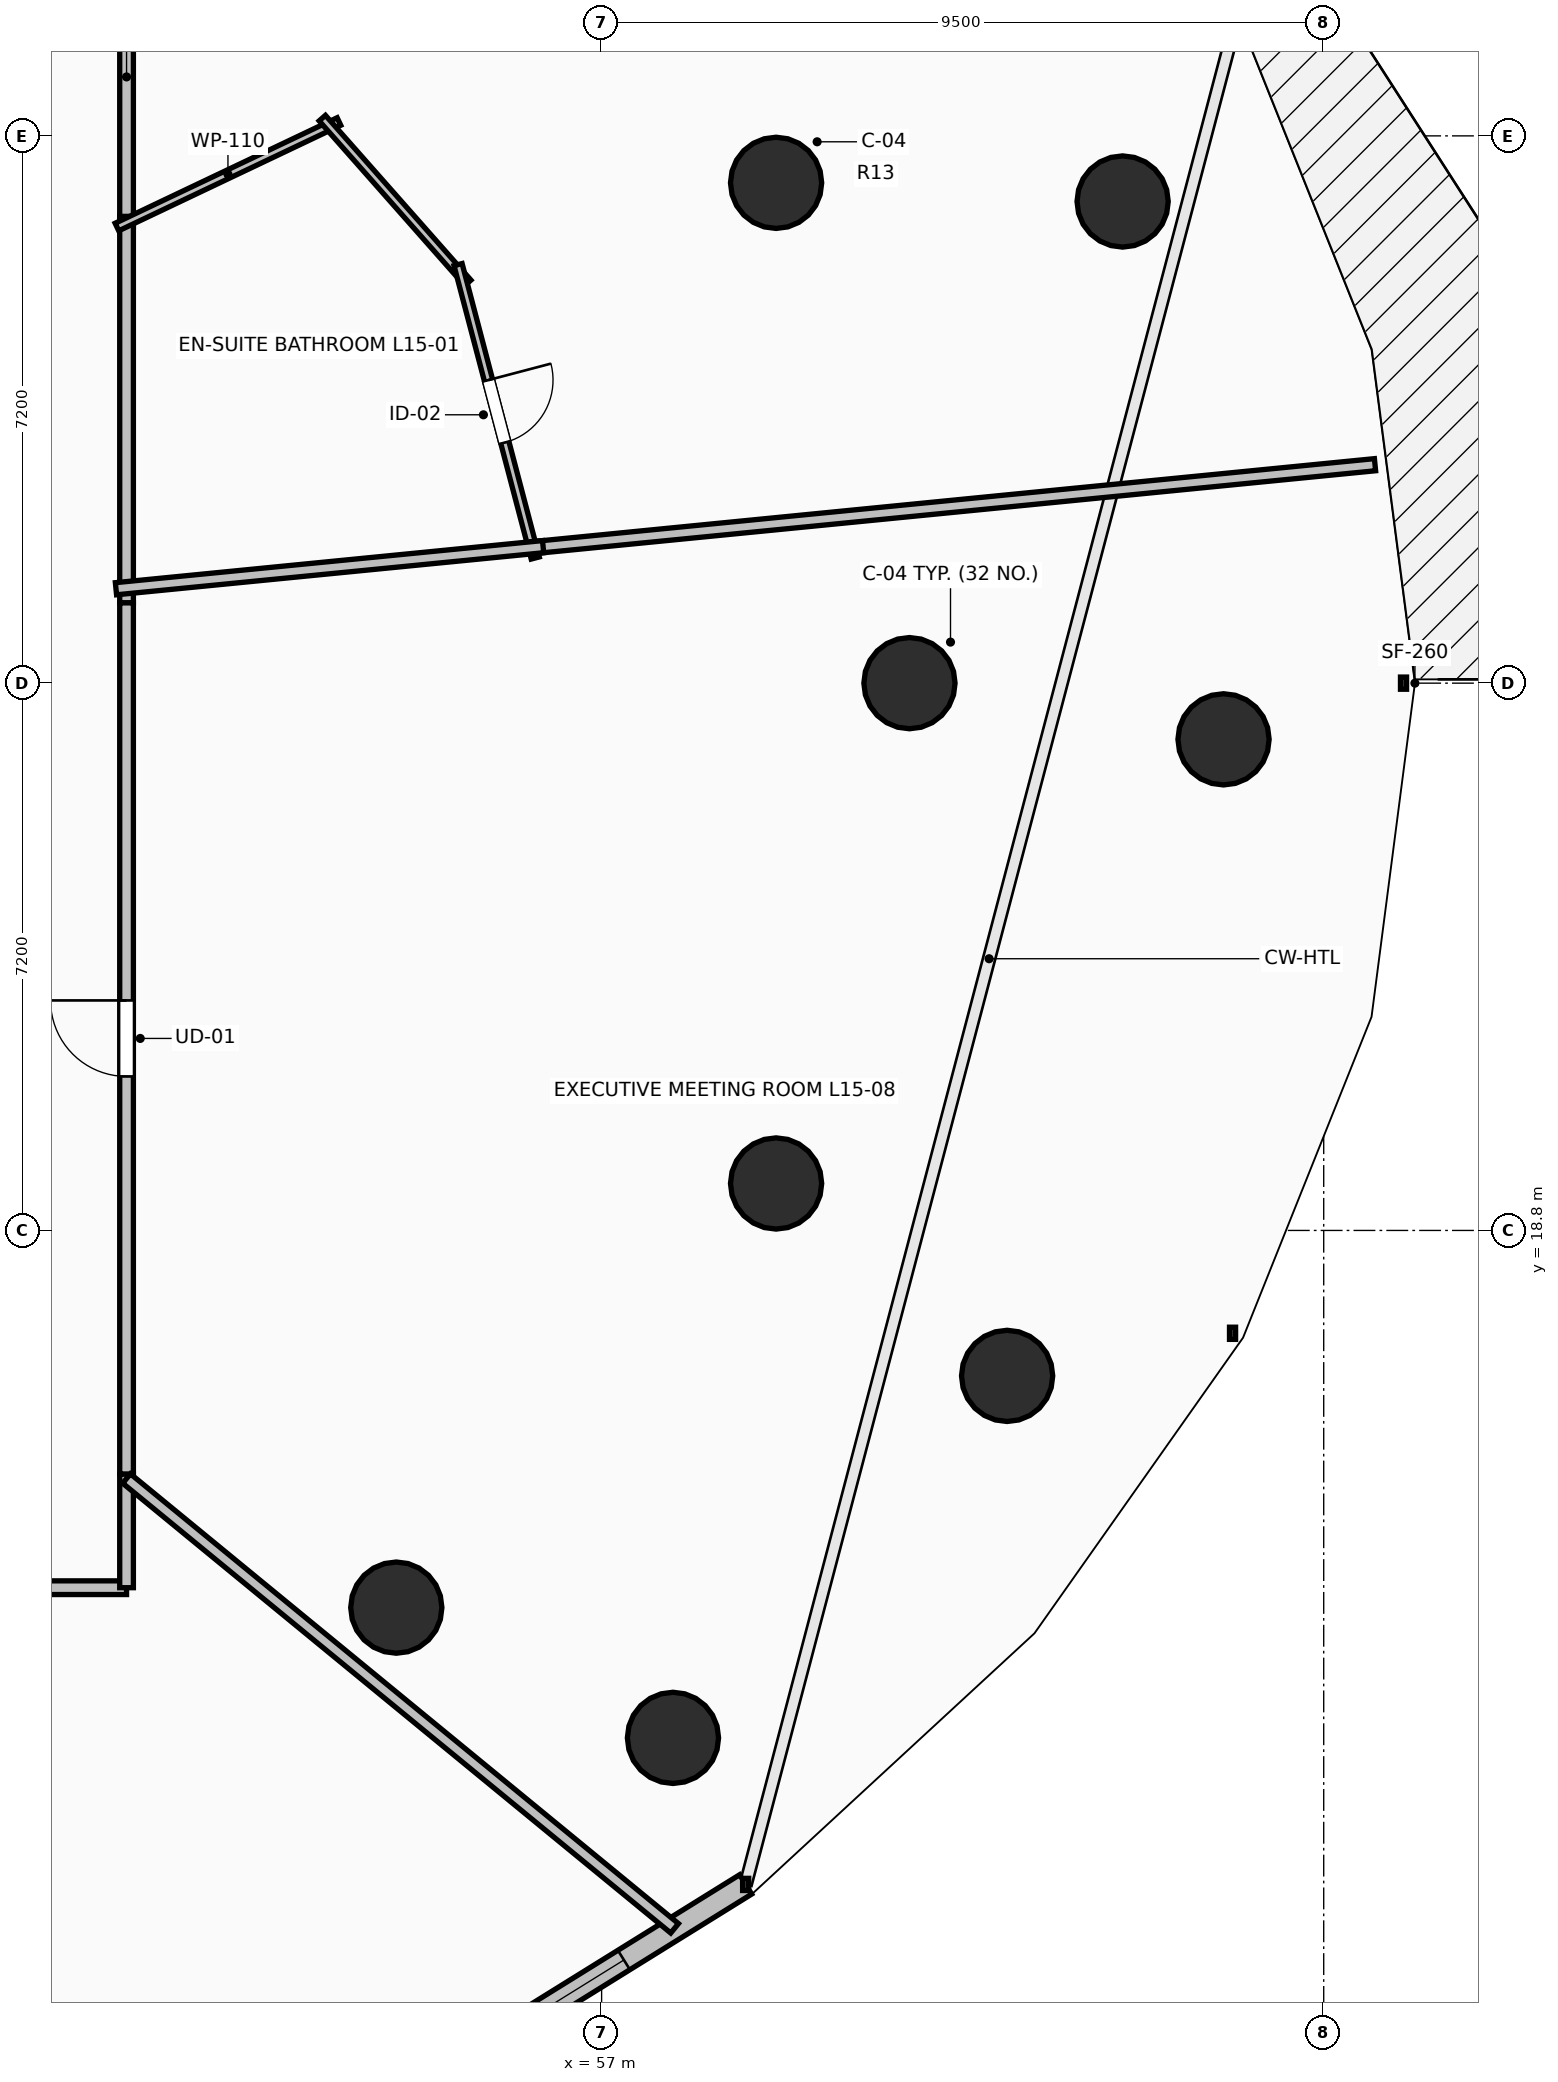
"""IFC4 building model, lengths in metres.
Left out: names, types, materials, properties, quantities, classifications, styles, units other than length and angle.
Written with IfcOpenShell. Run it as: python <this file> out.ifc"""

import sys

from ifc_helpers import new_model, si_unit, direction, frame, frame_2d, origin, origin_2d, place, context, subcontext, project, spatial, rectangle, circle, extrude, element, fill, save


model = new_model("IFC4")
c1 = context("Model", 3, precision=1e-05, world=origin(), true_north=direction((0.0, 1.0)))
c2 = subcontext(c1, "Body", "Model", "MODEL_VIEW")
j1 = project(units=[si_unit("LENGTHUNIT", "METRE"), si_unit("PLANEANGLEUNIT", "RADIAN")], contexts=[c1])
p1 = place(None, origin())
s1 = spatial("IfcSite", under=j1, at=p1, CompositionType="ELEMENT")
p2 = place(p1, origin())
s2 = spatial("IfcBuilding", under=s1, at=p2, CompositionType="ELEMENT")
p3 = place(p2, frame((0.0, 0.0, 59.0)))
s3 = spatial("IfcBuildingStorey", under=s2, at=p3, CompositionType="ELEMENT", Elevation=59.0)
for number, where, z_axis, x_axis in (
    (1, (61.05, 26.0, 0.0), (0.0, 0.0, 1.0), (1.0, 0.0, 0.0)),
    (2, (59.295, 32.582, 0.0), (0.0, 0.0, 1.0), (0.924, 0.383, 0.0)),
    (3, (54.299, 13.838, 0.0), (0.0, 0.0, 1.0), (0.707, -0.707, 0.0)),
    (4, (59.295, 19.418, 0.0), (0.0, 0.0, 1.0), (0.924, -0.383, 0.0)),
    (5, (65.182, 25.261, 0.0), (0.0, 0.0, 1.0), (1.0, 0.0, 0.0)),
    (6, (63.854, 32.337, 0.0), (0.0, 0.0, 1.0), (0.924, 0.383, 0.0)),
    (7, (57.939, 12.124, 0.0), (0.0, 0.0, 1.0), (0.707, -0.707, 0.0)),
    (8, (62.335, 16.886, 0.0), (0.0, 0.0, 1.0), (0.924, -0.383, 0.0)),
):
    element("IfcColumn", number, at=place(p3, frame(where, z_axis=z_axis, x_axis=x_axis)), inside=s3, PredefinedType="COLUMN", context=c2, shape_type="SweptSolid", body=[
        extrude(circle(Radius=0.6, at=origin_2d()), origin(), (0.0, 0.0, 1.0), 3.5),
    ])
p4 = place(p3, frame((54.417, 7.417, 0.0), z_axis=(0.0, 0.0, 1.0), x_axis=(0.849633724826, 0.527373239404, 0.0)))
e9 = element("IfcWall", 9, at=p4, inside=s3, PredefinedType="STANDARD", context=c2, shape_type="SweptSolid", body=[
    extrude(rectangle(XDim=5.271, YDim=0.3, at=frame_2d((2.635, 0.0))), origin(), (0.0, 0.0, 1.0), 3.24),
])
p5 = place(p4, frame((1.885, 0.0, 0.85)))
e10 = element("IfcOpeningElement", 10, at=p5, cuts=e9, PredefinedType="OPENING", context=c2, shape_type="SweptSolid", body=[
    extrude(rectangle(XDim=1.5, YDim=2.19, at=frame_2d((0.75, 1.095))), frame((0.0, 0.165, 0.0), z_axis=(0.0, -1.0, 0.0), x_axis=(1.0, 0.0, 0.0)), (0.0, 0.0, 1.0), 0.33),
])
p6 = place(p3, frame((50.75, 32.001, 0.0), z_axis=(0.0, 0.0, 1.0), x_axis=(0.0, 1.0, 0.0)))
e11 = element("IfcWall", 11, at=p6, inside=s3, PredefinedType="PARTITIONING", context=c2, shape_type="SweptSolid", body=[
    extrude(rectangle(XDim=3.949, YDim=0.18, at=frame_2d((1.975, 0.0))), origin(), (0.0, 0.0, 1.0), 2.432),
])
p7 = place(p3, frame((50.75, 27.056, 0.0), z_axis=(0.0, 0.0, 1.0), x_axis=(0.0, 1.0, 0.0)))
e12 = element("IfcWall", 12, at=p7, inside=s3, PredefinedType="PARTITIONING", context=c2, shape_type="SweptSolid", body=[
    extrude(rectangle(XDim=5.085, YDim=0.18, at=frame_2d((2.542, 0.0))), origin(), (0.0, 0.0, 1.0), 2.432),
])
p8 = place(p3, frame((42.34, 14.1, 0.0), z_axis=(0.0, 0.0, 1.0), x_axis=(1.0, 0.0, 0.0)))
e13 = element("IfcWall", 13, at=p8, inside=s3, PredefinedType="PARTITIONING", context=c2, shape_type="SweptSolid", body=[
    extrude(rectangle(XDim=8.41, YDim=0.18, at=frame_2d((4.205, 0.0))), origin(), (0.0, 0.0, 1.0), 2.432),
])
p9 = place(p8, frame((3.705, 0.0, 0.0)))
e14 = element("IfcOpeningElement", 14, at=p9, cuts=e13, PredefinedType="OPENING", context=c2, shape_type="SweptSolid", body=[
    extrude(rectangle(XDim=1.0, YDim=2.15, at=frame_2d((0.5, 1.075))), frame((0.0, 0.105, 0.0), z_axis=(0.0, -1.0, 0.0), x_axis=(1.0, 0.0, 0.0)), (0.0, 0.0, 1.0), 0.21),
])
p10 = place(p3, frame((50.75, 14.1, 0.0), z_axis=(0.0, 0.0, 1.0), x_axis=(0.0, 1.0, 0.0)))
e15 = element("IfcWall", 15, at=p10, inside=s3, PredefinedType="PARTITIONING", context=c2, shape_type="SweptSolid", body=[
    extrude(rectangle(XDim=1.496, YDim=0.18, at=frame_2d((0.748, 0.0))), origin(), (0.0, 0.0, 1.0), 2.432),
])
p11 = place(p3, frame((50.75, 15.596, 0.0), z_axis=(0.0, 0.0, 1.0), x_axis=(0.0, 1.0, 0.0)))
e16 = element("IfcWall", 16, at=p11, inside=s3, PredefinedType="PARTITIONING", context=c2, shape_type="SweptSolid", body=[
    extrude(rectangle(XDim=11.46, YDim=0.18, at=frame_2d((5.73, 0.0))), origin(), (0.0, 0.0, 1.0), 2.432),
])
p12 = place(p11, frame((5.23, 0.0, 0.0)))
e17 = element("IfcOpeningElement", 17, at=p12, cuts=e16, PredefinedType="OPENING", context=c2, shape_type="SweptSolid", body=[
    extrude(rectangle(XDim=1.0, YDim=2.15, at=frame_2d((0.5, 1.075))), frame((0.0, 0.105, 0.0), z_axis=(0.0, -1.0, 0.0), x_axis=(1.0, 0.0, 0.0)), (0.0, 0.0, 1.0), 0.21),
])
p13 = place(p3, frame((50.624, 32.001, 0.0), z_axis=(0.0, 0.0, 1.0), x_axis=(0.903186785932, 0.429247748647, 0.0)))
e18 = element("IfcWall", 18, at=p13, inside=s3, PredefinedType="PARTITIONING", context=c2, shape_type="SweptSolid", body=[
    extrude(rectangle(XDim=3.234, YDim=0.11, at=frame_2d((1.617, 0.0))), origin(), (0.0, 0.0, 1.0), 2.432),
])
p14 = place(p3, frame((53.325, 33.434, 0.0), z_axis=(0.0, 0.0, 1.0), x_axis=(0.661981720099, -0.749519981224, 0.0)))
e19 = element("IfcWall", 19, at=p14, inside=s3, PredefinedType="PARTITIONING", context=c2, shape_type="SweptSolid", body=[
    extrude(rectangle(XDim=2.892, YDim=0.11, at=frame_2d((1.446, 0.0))), origin(), (0.0, 0.0, 1.0), 2.432),
])
p15 = place(p3, frame((55.111, 31.506, 0.0), z_axis=(0.0, 0.0, 1.0), x_axis=(0.254405980461, -0.967097511684, 0.0)))
e20 = element("IfcWall", 20, at=p15, inside=s3, PredefinedType="PARTITIONING", context=c2, shape_type="SweptSolid", body=[
    extrude(rectangle(XDim=3.991, YDim=0.11, at=frame_2d((1.996, 0.0))), origin(), (0.0, 0.0, 1.0), 3.24),
])
p16 = place(p15, frame((1.571, 0.0, 0.0)))
e21 = element("IfcOpeningElement", 21, at=p16, cuts=e20, PredefinedType="OPENING", context=c2, shape_type="SweptSolid", body=[
    extrude(rectangle(XDim=0.85, YDim=2.1, at=frame_2d((0.425, 1.05))), frame((0.0, 0.07, 0.0), z_axis=(0.0, -1.0, 0.0), x_axis=(1.0, 0.0, 0.0)), (0.0, 0.0, 1.0), 0.14),
])
p17 = place(p3, frame((56.091, 27.782, 0.0), z_axis=(0.0, 0.0, 1.0), x_axis=(0.995181539585, 0.098049493977, 0.0)))
e22 = element("IfcWall", 22, at=p17, inside=s3, PredefinedType="PARTITIONING", context=c2, shape_type="SweptSolid", body=[
    extrude(rectangle(XDim=11.138, YDim=0.16, at=frame_2d((5.569, 0.0))), origin(), (0.0, 0.0, 1.0), 2.624),
])
p18 = place(p3, frame((50.611, 27.242, 0.0), z_axis=(0.0, 0.0, 1.0), x_axis=(0.995185043486, 0.098013923607, 0.0)))
e23 = element("IfcWall", 23, at=p18, inside=s3, PredefinedType="PARTITIONING", context=c2, shape_type="SweptSolid", body=[
    extrude(rectangle(XDim=5.647, YDim=0.16, at=frame_2d((2.823, 0.0))), origin(), (0.0, 0.0, 1.0), 2.432),
])
p19 = place(p3, frame((57.96, 9.619, 0.0), z_axis=(0.0, 0.0, 1.0), x_axis=(-0.773014125172, 0.634388810025, 0.0)))
e24 = element("IfcWall", 24, at=p19, inside=s3, PredefinedType="PARTITIONING", context=c2, shape_type="SweptSolid", body=[
    extrude(rectangle(XDim=9.327, YDim=0.16, at=frame_2d((4.664, 0.0))), origin(), (0.0, 0.0, 1.0), 2.432),
])
p20 = place(p5, origin())
e25 = element("IfcWindow", 25, at=p20, inside=s3, PartitioningType="SINGLE_PANEL", PredefinedType="WINDOW", context=c2, shape_type="SweptSolid", body=[
    extrude(rectangle(XDim=1.5, YDim=2.19, at=frame_2d((0.75, 1.095))), frame((0.0, 0.03, 0.0), z_axis=(0.0, -1.0, 0.0), x_axis=(1.0, 0.0, 0.0)), (0.0, 0.0, 1.0), 0.06),
])
fill(e10, e25)
p21 = place(p12, origin())
e26 = element("IfcDoor", 26, at=p21, inside=s3, OperationType="SINGLE_SWING_RIGHT", PredefinedType="DOOR", context=c2, shape_type="SweptSolid", body=[
    extrude(rectangle(XDim=1.0, YDim=2.15, at=frame_2d((0.5, 1.075))), frame((0.0, 0.025, 0.0), z_axis=(0.0, -1.0, 0.0), x_axis=(1.0, 0.0, 0.0)), (0.0, 0.0, 1.0), 0.05),
])
fill(e17, e26)
p22 = place(p16, origin())
e27 = element("IfcDoor", 27, at=p22, inside=s3, OperationType="SINGLE_SWING_LEFT", PredefinedType="DOOR", context=c2, shape_type="SweptSolid", body=[
    extrude(rectangle(XDim=0.85, YDim=2.1, at=frame_2d((0.425, 1.05))), frame((0.0, 0.025, 0.0), z_axis=(0.0, -1.0, 0.0), x_axis=(1.0, 0.0, 0.0)), (0.0, 0.0, 1.0), 0.05),
])
fill(e21, e27)
save(model, sys.argv[1])
